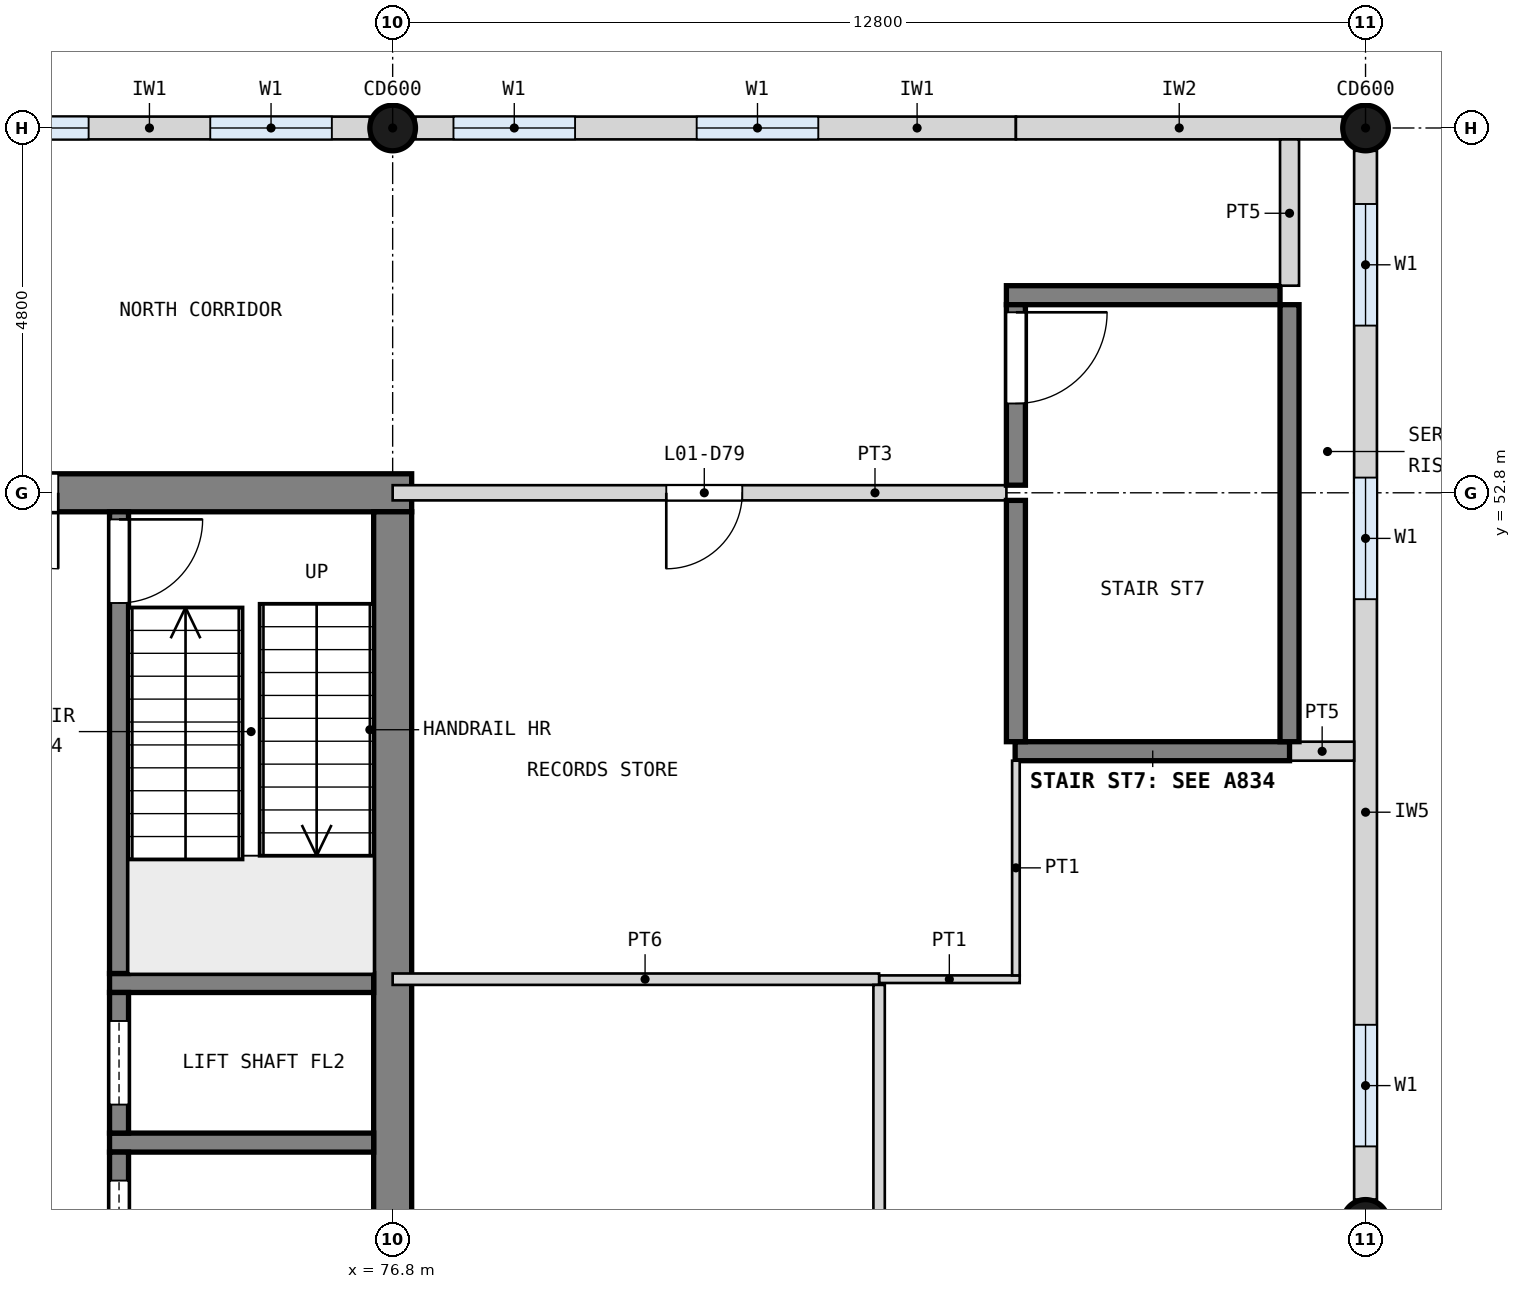
"""IFC4 building model, lengths in metres.
Left out: names, types, materials, properties, quantities, classifications, styles, units other than length and angle.
Written with IfcOpenShell. Run it as: python <this file> out.ifc"""

import sys

from ifc_helpers import new_model, si_unit, direction, frame, frame_2d, origin, origin_2d, place, context, subcontext, project, spatial, rectangle, circle, extrude, element, fill, save


model = new_model("IFC4")
c1 = context("Model", 3, precision=1e-05, world=origin(), true_north=direction((0.0, 1.0)))
c2 = subcontext(c1, "Body", "Model", "MODEL_VIEW")
j1 = project(units=[si_unit("LENGTHUNIT", "METRE"), si_unit("PLANEANGLEUNIT", "RADIAN")], contexts=[c1])
p1 = place(None, origin())
s1 = spatial("IfcSite", under=j1, at=p1, CompositionType="ELEMENT")
p2 = place(p1, origin())
s2 = spatial("IfcBuilding", under=s1, at=p2, CompositionType="ELEMENT")
p3 = place(p2, frame((0.0, 0.0, 4.2)))
s3 = spatial("IfcBuildingStorey", under=s2, at=p3, CompositionType="ELEMENT", Elevation=4.2)
p4 = place(p3, frame((63.75, 52.8, 0.0), z_axis=(0.0, 0.0, 1.0), x_axis=(1.0, 0.0, 0.0)))
e1 = element("IfcWall", 1, at=p4, inside=s3, PredefinedType="SHEAR", context=c2, shape_type="SweptSolid", body=[
    extrude(rectangle(XDim=13.3, YDim=0.5, at=frame_2d((6.65, 0.0))), origin(), (0.0, 0.0, 1.0), 4.2),
])
p5 = place(p4, frame((6.65, 0.0, 0.0)))
e2 = element("IfcOpeningElement", 2, at=p5, cuts=e1, PredefinedType="OPENING", context=c2, shape_type="SweptSolid", body=[
    extrude(rectangle(XDim=2.0, YDim=2.1, at=frame_2d((1.0, 1.05))), frame((0.0, 0.26, 0.0), z_axis=(0.0, -1.0, 0.0), x_axis=(1.0, 0.0, 0.0)), (0.0, 0.0, 1.0), 0.52),
])
p6 = place(p3, frame((76.8, 33.85, 0.0), z_axis=(0.0, 0.0, 1.0), x_axis=(0.0, 1.0, 0.0)))
e3 = element("IfcWall", 3, at=p6, inside=s3, PredefinedType="SHEAR", context=c2, shape_type="SweptSolid", body=[
    extrude(rectangle(XDim=18.7, YDim=0.5, at=frame_2d((9.35, 0.0))), origin(), (0.0, 0.0, 1.0), 4.2),
])
for number, where, z_axis, x_axis in (
    (4, (89.6, 43.2, 0.0), (0.0, 0.0, 1.0), (1.0, 0.0, 0.0)),
    (5, (89.6, 57.6, 0.0), (0.0, 0.0, 1.0), (1.0, 0.0, 0.0)),
    (6, (76.8, 57.6, 0.0), (0.0, 0.0, 1.0), (1.0, 0.0, 0.0)),
):
    element("IfcColumn", number, at=place(p3, frame(where, z_axis=z_axis, x_axis=x_axis)), inside=s3, PredefinedType="COLUMN", context=c2, shape_type="SweptSolid", body=[
        extrude(circle(Radius=0.3, at=origin_2d()), origin(), (0.0, 0.0, 1.0), 4.2),
    ])
p7 = place(p3, frame((64.0, 57.6, 0.0), z_axis=(0.0, 0.0, 1.0), x_axis=(1.0, 0.0, 0.0)))
e7 = element("IfcWall", 7, at=p7, inside=s3, PredefinedType="SOLIDWALL", context=c2, shape_type="SweptSolid", body=[
    extrude(rectangle(XDim=12.5, YDim=0.3, at=frame_2d((6.25, 0.0))), origin(), (0.0, 0.0, 1.0), 3.0),
])
p8 = place(p7, frame((0.8, 0.0, 1.0)))
e8 = element("IfcOpeningElement", 8, at=p8, cuts=e7, PredefinedType="OPENING", context=c2, shape_type="SweptSolid", body=[
    extrude(rectangle(XDim=1.6, YDim=1.8, at=frame_2d((0.8, 0.9))), frame((0.0, 0.16, 0.0), z_axis=(0.0, -1.0, 0.0), x_axis=(1.0, 0.0, 0.0)), (0.0, 0.0, 1.0), 0.32),
])
p9 = place(p7, frame((4.0, 0.0, 1.0)))
e9 = element("IfcOpeningElement", 9, at=p9, cuts=e7, PredefinedType="OPENING", context=c2, shape_type="SweptSolid", body=[
    extrude(rectangle(XDim=1.6, YDim=1.8, at=frame_2d((0.8, 0.9))), frame((0.0, 0.16, 0.0), z_axis=(0.0, -1.0, 0.0), x_axis=(1.0, 0.0, 0.0)), (0.0, 0.0, 1.0), 0.32),
])
p10 = place(p7, frame((7.2, 0.0, 1.0)))
e10 = element("IfcOpeningElement", 10, at=p10, cuts=e7, PredefinedType="OPENING", context=c2, shape_type="SweptSolid", body=[
    extrude(rectangle(XDim=1.6, YDim=1.8, at=frame_2d((0.8, 0.9))), frame((0.0, 0.16, 0.0), z_axis=(0.0, -1.0, 0.0), x_axis=(1.0, 0.0, 0.0)), (0.0, 0.0, 1.0), 0.32),
])
p11 = place(p7, frame((10.4, 0.0, 1.0)))
e11 = element("IfcOpeningElement", 11, at=p11, cuts=e7, PredefinedType="OPENING", context=c2, shape_type="SweptSolid", body=[
    extrude(rectangle(XDim=1.6, YDim=1.8, at=frame_2d((0.8, 0.9))), frame((0.0, 0.16, 0.0), z_axis=(0.0, -1.0, 0.0), x_axis=(1.0, 0.0, 0.0)), (0.0, 0.0, 1.0), 0.32),
])
p12 = place(p3, frame((77.1, 57.6, 0.0), z_axis=(0.0, 0.0, 1.0), x_axis=(1.0, 0.0, 0.0)))
e12 = element("IfcWall", 12, at=p12, inside=s3, PredefinedType="SOLIDWALL", context=c2, shape_type="SweptSolid", body=[
    extrude(rectangle(XDim=7.9, YDim=0.3, at=frame_2d((3.95, 0.0))), origin(), (0.0, 0.0, 1.0), 3.0),
])
p13 = place(p12, frame((0.5, 0.0, 1.0)))
e13 = element("IfcOpeningElement", 13, at=p13, cuts=e12, PredefinedType="OPENING", context=c2, shape_type="SweptSolid", body=[
    extrude(rectangle(XDim=1.6, YDim=1.8, at=frame_2d((0.8, 0.9))), frame((0.0, 0.16, 0.0), z_axis=(0.0, -1.0, 0.0), x_axis=(1.0, 0.0, 0.0)), (0.0, 0.0, 1.0), 0.32),
])
p14 = place(p12, frame((3.7, 0.0, 1.0)))
e14 = element("IfcOpeningElement", 14, at=p14, cuts=e12, PredefinedType="OPENING", context=c2, shape_type="SweptSolid", body=[
    extrude(rectangle(XDim=1.6, YDim=1.8, at=frame_2d((0.8, 0.9))), frame((0.0, 0.16, 0.0), z_axis=(0.0, -1.0, 0.0), x_axis=(1.0, 0.0, 0.0)), (0.0, 0.0, 1.0), 0.32),
])
p15 = place(p3, frame((85.0, 57.6, 0.0), z_axis=(0.0, 0.0, 1.0), x_axis=(1.0, 0.0, 0.0)))
e15 = element("IfcWall", 15, at=p15, inside=s3, PredefinedType="SOLIDWALL", context=c2, shape_type="SweptSolid", body=[
    extrude(rectangle(XDim=4.3, YDim=0.3, at=frame_2d((2.15, 0.0))), origin(), (0.0, 0.0, 1.0), 3.0),
])
p16 = place(p3, frame((89.6, 43.5, 0.0), z_axis=(0.0, 0.0, 1.0), x_axis=(0.0, 1.0, 0.0)))
e16 = element("IfcWall", 16, at=p16, inside=s3, PredefinedType="SOLIDWALL", context=c2, shape_type="SweptSolid", body=[
    extrude(rectangle(XDim=13.8, YDim=0.3, at=frame_2d((6.9, 0.0))), origin(), (0.0, 0.0, 1.0), 2.9),
])
p17 = place(p16, frame((0.7, 0.0, 1.0)))
e17 = element("IfcOpeningElement", 17, at=p17, cuts=e16, PredefinedType="OPENING", context=c2, shape_type="SweptSolid", body=[
    extrude(rectangle(XDim=1.6, YDim=1.8, at=frame_2d((0.8, 0.9))), frame((0.0, 0.16, 0.0), z_axis=(0.0, -1.0, 0.0), x_axis=(1.0, 0.0, 0.0)), (0.0, 0.0, 1.0), 0.32),
])
p18 = place(p16, frame((7.9, 0.0, 1.0)))
e18 = element("IfcOpeningElement", 18, at=p18, cuts=e16, PredefinedType="OPENING", context=c2, shape_type="SweptSolid", body=[
    extrude(rectangle(XDim=1.6, YDim=1.8, at=frame_2d((0.8, 0.9))), frame((0.0, 0.16, 0.0), z_axis=(0.0, -1.0, 0.0), x_axis=(1.0, 0.0, 0.0)), (0.0, 0.0, 1.0), 0.32),
])
p19 = place(p16, frame((11.5, 0.0, 1.0)))
e19 = element("IfcOpeningElement", 19, at=p19, cuts=e16, PredefinedType="OPENING", context=c2, shape_type="SweptSolid", body=[
    extrude(rectangle(XDim=1.6, YDim=1.8, at=frame_2d((0.8, 0.9))), frame((0.0, 0.16, 0.0), z_axis=(0.0, -1.0, 0.0), x_axis=(1.0, 0.0, 0.0)), (0.0, 0.0, 1.0), 0.32),
])
for number, where, z_axis, x_axis in (
    (20, (76.55, 44.25, 0.0), (0.0, 0.0, 1.0), (-1.0, 0.0, 0.0)),
    (21, (76.55, 46.35, 0.0), (0.0, 0.0, 1.0), (-1.0, 0.0, 0.0)),
):
    element("IfcWall", number, at=place(p3, frame(where, z_axis=z_axis, x_axis=x_axis)), inside=s3, PredefinedType="SOLIDWALL", context=c2, shape_type="SweptSolid", body=[
        extrude(rectangle(XDim=3.475, YDim=0.25, at=frame_2d((1.738, 0.0))), origin(), (0.0, 0.0, 1.0), 3.9),
    ])
p20 = place(p3, frame((73.2, 42.275, 0.0), z_axis=(0.0, 0.0, 1.0), x_axis=(0.0, 1.0, 0.0)))
e22 = element("IfcWall", 22, at=p20, inside=s3, PredefinedType="SOLIDWALL", context=c2, shape_type="SweptSolid", body=[
    extrude(rectangle(XDim=1.85, YDim=0.25, at=frame_2d((0.925, 0.0))), origin(), (0.0, 0.0, 1.0), 3.9),
])
p21 = place(p20, frame((0.375, 0.0, 0.0)))
e23 = element("IfcOpeningElement", 23, at=p21, cuts=e22, PredefinedType="OPENING", context=c2, shape_type="SweptSolid", body=[
    extrude(rectangle(XDim=1.1, YDim=2.1, at=frame_2d((0.55, 1.05))), frame((0.0, 0.135, 0.0), z_axis=(0.0, -1.0, 0.0), x_axis=(1.0, 0.0, 0.0)), (0.0, 0.0, 1.0), 0.27),
])
p22 = place(p3, frame((73.2, 44.375, 0.0), z_axis=(0.0, 0.0, 1.0), x_axis=(0.0, 1.0, 0.0)))
e24 = element("IfcWall", 24, at=p22, inside=s3, PredefinedType="SOLIDWALL", context=c2, shape_type="SweptSolid", body=[
    extrude(rectangle(XDim=1.85, YDim=0.25, at=frame_2d((0.925, 0.0))), origin(), (0.0, 0.0, 1.0), 3.9),
])
p23 = place(p22, frame((0.375, 0.0, 0.0)))
e25 = element("IfcOpeningElement", 25, at=p23, cuts=e24, PredefinedType="OPENING", context=c2, shape_type="SweptSolid", body=[
    extrude(rectangle(XDim=1.1, YDim=2.1, at=frame_2d((0.55, 1.05))), frame((0.0, 0.135, 0.0), z_axis=(0.0, -1.0, 0.0), x_axis=(1.0, 0.0, 0.0)), (0.0, 0.0, 1.0), 0.27),
])
p24 = place(p3, frame((73.2, 46.475, 0.0), z_axis=(0.0, 0.0, 1.0), x_axis=(0.0, 1.0, 0.0)))
e26 = element("IfcWall", 26, at=p24, inside=s3, PredefinedType="SOLIDWALL", context=c2, shape_type="SweptSolid", body=[
    extrude(rectangle(XDim=6.075, YDim=0.25, at=frame_2d((3.038, 0.0))), origin(), (0.0, 0.0, 1.0), 3.9),
])
p25 = place(p24, frame((4.875, 0.0, 0.0)))
e27 = element("IfcOpeningElement", 27, at=p25, cuts=e26, PredefinedType="OPENING", context=c2, shape_type="SweptSolid", body=[
    extrude(rectangle(XDim=1.1, YDim=2.1, at=frame_2d((0.55, 1.05))), frame((0.0, 0.135, 0.0), z_axis=(0.0, -1.0, 0.0), x_axis=(1.0, 0.0, 0.0)), (0.0, 0.0, 1.0), 0.27),
])
p26 = place(p3, frame((85.05, 46.4, 0.0), z_axis=(0.0, 0.0, 1.0), x_axis=(-1.0, 0.0, 0.0)))
e28 = element("IfcWall", 28, at=p26, inside=s3, PredefinedType="PARTITIONING", context=c2, shape_type="SweptSolid", body=[
    extrude(rectangle(XDim=1.85, YDim=0.1, at=frame_2d((0.925, 0.0))), origin(), (0.0, 0.0, 1.0), 3.9),
])
p27 = place(p3, frame((83.2, 46.4, 0.0), z_axis=(0.0, 0.0, 1.0), x_axis=(-1.0, 0.0, 0.0)))
e29 = element("IfcWall", 29, at=p27, inside=s3, PredefinedType="PARTITIONING", context=c2, shape_type="SweptSolid", body=[
    extrude(rectangle(XDim=6.4, YDim=0.15, at=frame_2d((3.2, 0.0))), origin(), (0.0, 0.0, 1.0), 3.9),
])
p28 = place(p3, frame((89.45, 49.4, 0.0), z_axis=(0.0, 0.0, 1.0), x_axis=(-1.0, 0.0, 0.0)))
e30 = element("IfcWall", 30, at=p28, inside=s3, PredefinedType="PARTITIONING", context=c2, shape_type="SweptSolid", body=[
    extrude(rectangle(XDim=0.85, YDim=0.25, at=frame_2d((0.425, 0.0))), origin(), (0.0, 0.0, 1.0), 3.9),
])
p29 = place(p3, frame((88.6, 49.4, 0.0), z_axis=(0.0, 0.0, 1.0), x_axis=(-1.0, 0.0, 0.0)))
e31 = element("IfcWall", 31, at=p29, inside=s3, PredefinedType="SHEAR", context=c2, shape_type="SweptSolid", body=[
    extrude(rectangle(XDim=3.61, YDim=0.25, at=frame_2d((1.805, 0.0))), origin(), (0.0, 0.0, 1.0), 3.9),
])
p30 = place(p3, frame((84.875, 52.8, 0.0), z_axis=(0.0, 0.0, 1.0), x_axis=(-1.0, 0.0, 0.0)))
e32 = element("IfcWall", 32, at=p30, inside=s3, PredefinedType="PARTITIONING", context=c2, shape_type="SweptSolid", body=[
    extrude(rectangle(XDim=8.075, YDim=0.2, at=frame_2d((4.038, 0.0))), origin(), (0.0, 0.0, 1.0), 3.9),
])
p31 = place(p30, frame((3.475, 0.0, 0.0)))
e33 = element("IfcOpeningElement", 33, at=p31, cuts=e32, PredefinedType="OPENING", context=c2, shape_type="SweptSolid", body=[
    extrude(rectangle(XDim=1.0, YDim=2.1, at=frame_2d((0.5, 1.05))), frame((0.0, 0.11, 0.0), z_axis=(0.0, -1.0, 0.0), x_axis=(1.0, 0.0, 0.0)), (0.0, 0.0, 1.0), 0.22),
])
p32 = place(p3, frame((88.475, 55.4, 0.0), z_axis=(0.0, 0.0, 1.0), x_axis=(-1.0, 0.0, 0.0)))
e34 = element("IfcWall", 34, at=p32, inside=s3, PredefinedType="SHEAR", context=c2, shape_type="SweptSolid", body=[
    extrude(rectangle(XDim=3.6, YDim=0.25, at=frame_2d((1.8, 0.0))), origin(), (0.0, 0.0, 1.0), 3.9),
])
p33 = place(p3, frame((88.6, 49.525, 0.0), z_axis=(0.0, 0.0, 1.0), x_axis=(0.0, 1.0, 0.0)))
e35 = element("IfcWall", 35, at=p33, inside=s3, PredefinedType="SHEAR", context=c2, shape_type="SweptSolid", body=[
    extrude(rectangle(XDim=5.75, YDim=0.25, at=frame_2d((2.875, 0.0))), origin(), (0.0, 0.0, 1.0), 3.9),
])
p34 = place(p3, frame((88.6, 55.525, 0.0), z_axis=(0.0, 0.0, 1.0), x_axis=(0.0, 1.0, 0.0)))
e36 = element("IfcWall", 36, at=p34, inside=s3, PredefinedType="PARTITIONING", context=c2, shape_type="SweptSolid", body=[
    extrude(rectangle(XDim=1.925, YDim=0.25, at=frame_2d((0.962, 0.0))), origin(), (0.0, 0.0, 1.0), 3.9),
])
p35 = place(p3, frame((85.0, 46.45, 0.0), z_axis=(0.0, 0.0, 1.0), x_axis=(0.0, 1.0, 0.0)))
e37 = element("IfcWall", 37, at=p35, inside=s3, PredefinedType="PARTITIONING", context=c2, shape_type="SweptSolid", body=[
    extrude(rectangle(XDim=2.825, YDim=0.1, at=frame_2d((1.413, 0.0))), origin(), (0.0, 0.0, 1.0), 3.9),
])
p36 = place(p3, frame((85.0, 49.525, 0.0), z_axis=(0.0, 0.0, 1.0), x_axis=(0.0, 1.0, 0.0)))
e38 = element("IfcWall", 38, at=p36, inside=s3, PredefinedType="SHEAR", context=c2, shape_type="SweptSolid", body=[
    extrude(rectangle(XDim=3.175, YDim=0.25, at=frame_2d((1.587, 0.0))), origin(), (0.0, 0.0, 1.0), 3.9),
])
p37 = place(p3, frame((85.0, 52.9, 0.0), z_axis=(0.0, 0.0, 1.0), x_axis=(0.0, 1.0, 0.0)))
e39 = element("IfcWall", 39, at=p37, inside=s3, PredefinedType="SHEAR", context=c2, shape_type="SweptSolid", body=[
    extrude(rectangle(XDim=2.375, YDim=0.25, at=frame_2d((1.188, 0.0))), origin(), (0.0, 0.0, 1.0), 3.9),
])
p38 = place(p37, frame((1.075, 0.0, 0.0)))
e40 = element("IfcOpeningElement", 40, at=p38, cuts=e39, PredefinedType="OPENING", context=c2, shape_type="SweptSolid", body=[
    extrude(rectangle(XDim=1.2, YDim=2.1, at=frame_2d((0.6, 1.05))), frame((0.0, 0.135, 0.0), z_axis=(0.0, -1.0, 0.0), x_axis=(1.0, 0.0, 0.0)), (0.0, 0.0, 1.0), 0.27),
])
p39 = place(p3, frame((83.2, 33.7, 0.0), z_axis=(0.0, 0.0, 1.0), x_axis=(0.0, 1.0, 0.0)))
e41 = element("IfcWall", 41, at=p39, inside=s3, PredefinedType="PARTITIONING", context=c2, shape_type="SweptSolid", body=[
    extrude(rectangle(XDim=12.625, YDim=0.15, at=frame_2d((6.312, 0.0))), origin(), (0.0, 0.0, 1.0), 2.9),
])
p40 = place(p25, frame((1.1, 0.0, 0.0), z_axis=(0.0, 0.0, 1.0), x_axis=(-1.0, 0.0, 0.0)))
e42 = element("IfcDoor", 42, at=p40, inside=s3, OperationType="SINGLE_SWING_LEFT", PredefinedType="DOOR", context=c2, shape_type="SweptSolid", body=[
    extrude(rectangle(XDim=1.1, YDim=2.1, at=frame_2d((0.55, 1.05))), frame((0.0, 0.025, 0.0), z_axis=(0.0, -1.0, 0.0), x_axis=(1.0, 0.0, 0.0)), (0.0, 0.0, 1.0), 0.05),
])
fill(e27, e42)
p41 = place(p21, origin())
e43 = element("IfcDoor", 43, at=p41, inside=s3, OperationType="SLIDING_TO_LEFT", PredefinedType="DOOR", context=c2, shape_type="SweptSolid", body=[
    extrude(rectangle(XDim=1.1, YDim=2.1, at=frame_2d((0.55, 1.05))), frame((0.0, 0.025, 0.0), z_axis=(0.0, -1.0, 0.0), x_axis=(1.0, 0.0, 0.0)), (0.0, 0.0, 1.0), 0.05),
])
fill(e23, e43)
p42 = place(p23, origin())
e44 = element("IfcDoor", 44, at=p42, inside=s3, OperationType="SLIDING_TO_LEFT", PredefinedType="DOOR", context=c2, shape_type="SweptSolid", body=[
    extrude(rectangle(XDim=1.1, YDim=2.1, at=frame_2d((0.55, 1.05))), frame((0.0, 0.025, 0.0), z_axis=(0.0, -1.0, 0.0), x_axis=(1.0, 0.0, 0.0)), (0.0, 0.0, 1.0), 0.05),
])
fill(e25, e44)
p43 = place(p5, frame((2.0, 0.0, 0.0), z_axis=(0.0, 0.0, 1.0), x_axis=(-1.0, 0.0, 0.0)))
e45 = element("IfcDoor", 45, at=p43, inside=s3, OperationType="DOUBLE_DOOR_SINGLE_SWING", PredefinedType="DOOR", context=c2, shape_type="SweptSolid", body=[
    extrude(rectangle(XDim=2.0, YDim=2.1, at=frame_2d((1.0, 1.05))), frame((0.0, 0.025, 0.0), z_axis=(0.0, -1.0, 0.0), x_axis=(1.0, 0.0, 0.0)), (0.0, 0.0, 1.0), 0.05),
])
fill(e2, e45)
p44 = place(p31, origin())
e46 = element("IfcDoor", 46, at=p44, inside=s3, OperationType="SINGLE_SWING_RIGHT", PredefinedType="DOOR", context=c2, shape_type="SweptSolid", body=[
    extrude(rectangle(XDim=1.0, YDim=2.1, at=frame_2d((0.5, 1.05))), frame((0.0, 0.025, 0.0), z_axis=(0.0, -1.0, 0.0), x_axis=(1.0, 0.0, 0.0)), (0.0, 0.0, 1.0), 0.05),
])
fill(e33, e46)
p45 = place(p38, frame((1.2, 0.0, 0.0), z_axis=(0.0, 0.0, 1.0), x_axis=(-1.0, 0.0, 0.0)))
e47 = element("IfcDoor", 47, at=p45, inside=s3, OperationType="SINGLE_SWING_LEFT", PredefinedType="DOOR", context=c2, shape_type="SweptSolid", body=[
    extrude(rectangle(XDim=1.2, YDim=2.1, at=frame_2d((0.6, 1.05))), frame((0.0, 0.025, 0.0), z_axis=(0.0, -1.0, 0.0), x_axis=(1.0, 0.0, 0.0)), (0.0, 0.0, 1.0), 0.05),
])
fill(e40, e47)
p46 = place(p10, origin())
e48 = element("IfcWindow", 48, at=p46, inside=s3, PartitioningType="SINGLE_PANEL", PredefinedType="WINDOW", context=c2, shape_type="SweptSolid", body=[
    extrude(rectangle(XDim=1.6, YDim=1.8, at=frame_2d((0.8, 0.9))), frame((0.0, 0.03, 0.0), z_axis=(0.0, -1.0, 0.0), x_axis=(1.0, 0.0, 0.0)), (0.0, 0.0, 1.0), 0.06),
])
fill(e10, e48)
p47 = place(p11, origin())
e49 = element("IfcWindow", 49, at=p47, inside=s3, PartitioningType="SINGLE_PANEL", PredefinedType="WINDOW", context=c2, shape_type="SweptSolid", body=[
    extrude(rectangle(XDim=1.6, YDim=1.8, at=frame_2d((0.8, 0.9))), frame((0.0, 0.03, 0.0), z_axis=(0.0, -1.0, 0.0), x_axis=(1.0, 0.0, 0.0)), (0.0, 0.0, 1.0), 0.06),
])
fill(e11, e49)
p48 = place(p13, origin())
e50 = element("IfcWindow", 50, at=p48, inside=s3, PartitioningType="SINGLE_PANEL", PredefinedType="WINDOW", context=c2, shape_type="SweptSolid", body=[
    extrude(rectangle(XDim=1.6, YDim=1.8, at=frame_2d((0.8, 0.9))), frame((0.0, 0.03, 0.0), z_axis=(0.0, -1.0, 0.0), x_axis=(1.0, 0.0, 0.0)), (0.0, 0.0, 1.0), 0.06),
])
fill(e13, e50)
p49 = place(p14, origin())
e51 = element("IfcWindow", 51, at=p49, inside=s3, PartitioningType="SINGLE_PANEL", PredefinedType="WINDOW", context=c2, shape_type="SweptSolid", body=[
    extrude(rectangle(XDim=1.6, YDim=1.8, at=frame_2d((0.8, 0.9))), frame((0.0, 0.03, 0.0), z_axis=(0.0, -1.0, 0.0), x_axis=(1.0, 0.0, 0.0)), (0.0, 0.0, 1.0), 0.06),
])
fill(e14, e51)
p50 = place(p17, origin())
e52 = element("IfcWindow", 52, at=p50, inside=s3, PartitioningType="SINGLE_PANEL", PredefinedType="WINDOW", context=c2, shape_type="SweptSolid", body=[
    extrude(rectangle(XDim=1.6, YDim=1.8, at=frame_2d((0.8, 0.9))), frame((0.0, 0.03, 0.0), z_axis=(0.0, -1.0, 0.0), x_axis=(1.0, 0.0, 0.0)), (0.0, 0.0, 1.0), 0.06),
])
fill(e17, e52)
p51 = place(p18, origin())
e53 = element("IfcWindow", 53, at=p51, inside=s3, PartitioningType="SINGLE_PANEL", PredefinedType="WINDOW", context=c2, shape_type="SweptSolid", body=[
    extrude(rectangle(XDim=1.6, YDim=1.8, at=frame_2d((0.8, 0.9))), frame((0.0, 0.03, 0.0), z_axis=(0.0, -1.0, 0.0), x_axis=(1.0, 0.0, 0.0)), (0.0, 0.0, 1.0), 0.06),
])
fill(e18, e53)
p52 = place(p19, origin())
e54 = element("IfcWindow", 54, at=p52, inside=s3, PartitioningType="SINGLE_PANEL", PredefinedType="WINDOW", context=c2, shape_type="SweptSolid", body=[
    extrude(rectangle(XDim=1.6, YDim=1.8, at=frame_2d((0.8, 0.9))), frame((0.0, 0.03, 0.0), z_axis=(0.0, -1.0, 0.0), x_axis=(1.0, 0.0, 0.0)), (0.0, 0.0, 1.0), 0.06),
])
fill(e19, e54)
save(model, sys.argv[1])
